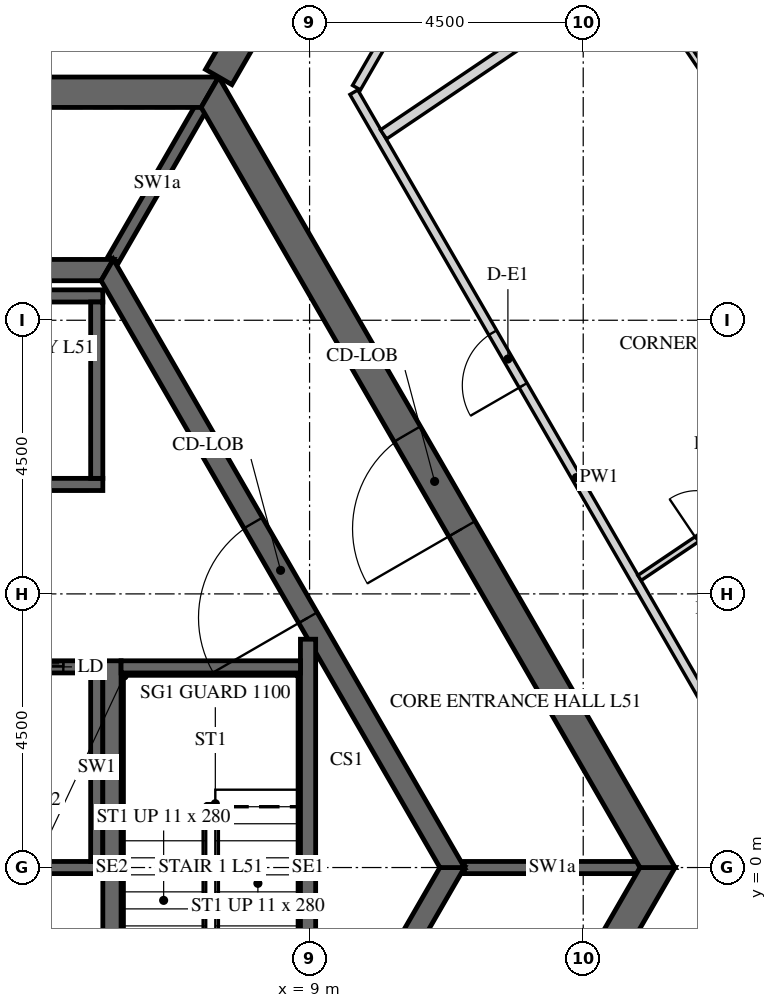
"""IFC4 building model, lengths in metres.
Left out: names, types, materials, properties, quantities, classifications, styles, units other than length and angle.
Written with IfcOpenShell. Run it as: python <this file> out.ifc"""

import sys

from ifc_helpers import new_model, si_unit, direction, frame, frame_2d, origin, place, context, subcontext, project, spatial, polyline, rectangle, outline, extrude, element, fill, save


model = new_model("IFC4")
c1 = context("Model", 3, precision=1e-05, world=origin(), true_north=direction((0.0, 1.0)))
c2 = subcontext(c1, "Body", "Model", "MODEL_VIEW")
j1 = project(units=[si_unit("LENGTHUNIT", "METRE"), si_unit("PLANEANGLEUNIT", "RADIAN")], contexts=[c1])
p1 = place(None, origin())
s1 = spatial("IfcSite", under=j1, at=p1, CompositionType="ELEMENT")
p2 = place(p1, origin())
s2 = spatial("IfcBuilding", under=s1, at=p2, CompositionType="ELEMENT")
p3 = place(p2, frame((0.0, 0.0, 215.1)))
s3 = spatial("IfcBuildingStorey", under=s2, at=p3, CompositionType="ELEMENT", Elevation=215.1)
p4 = place(p3, frame((7.361, -12.75, -0.15), z_axis=(0.0, 0.0, 1.0), x_axis=(0.50000571537, 0.866022103989, 0.0)))
e1 = element("IfcWall", 1, at=p4, inside=s3, PredefinedType="SHEAR", context=c2, shape_type="SweptSolid", body=[
    extrude(outline(polyline([(-0.144, -0.25), (14.867, -0.25), (14.578, 0.25), (0.144, 0.25), (-0.144, -0.25)])), origin(), (0.0, 0.0, 1.0), 3.9),
])
p5 = place(p4, frame((6.49, 0.0, 0.15)))
e2 = element("IfcOpeningElement", 2, at=p5, cuts=e1, PredefinedType="OPENING", context=c2, shape_type="SweptSolid", body=[
    extrude(rectangle(XDim=1.8, YDim=2.4, at=frame_2d((0.9, 1.2))), frame((0.0, 0.26, 0.0), z_axis=(0.0, -1.0, 0.0), x_axis=(1.0, 0.0, 0.0)), (0.0, 0.0, 1.0), 0.52),
])
p6 = place(p3, frame((14.722, 0.0, -0.15), z_axis=(0.0, 0.0, 1.0), x_axis=(-0.50000571537, 0.866022103989, 0.0)))
e3 = element("IfcWall", 3, at=p6, inside=s3, PredefinedType="SHEAR", context=c2, shape_type="SweptSolid", body=[
    extrude(outline(polyline([(-0.144, -0.25), (14.867, -0.25), (14.578, 0.25), (0.144, 0.25), (-0.144, -0.25)])), origin(), (0.0, 0.0, 1.0), 3.9),
])
p7 = place(p6, frame((6.432, 0.0, 0.15)))
e4 = element("IfcOpeningElement", 4, at=p7, cuts=e3, PredefinedType="OPENING", context=c2, shape_type="SweptSolid", body=[
    extrude(rectangle(XDim=1.8, YDim=2.4, at=frame_2d((0.9, 1.2))), frame((0.0, 0.26, 0.0), z_axis=(0.0, -1.0, 0.0), x_axis=(1.0, 0.0, 0.0)), (0.0, 0.0, 1.0), 0.52),
])
p8 = place(p3, frame((7.361, 12.75, -0.15), z_axis=(0.0, 0.0, 1.0), x_axis=(-1.0, 0.0, 0.0)))
e5 = element("IfcWall", 5, at=p8, inside=s3, PredefinedType="SHEAR", context=c2, shape_type="SweptSolid", body=[
    extrude(outline(polyline([(-0.144, -0.25), (14.866, -0.25), (14.578, 0.25), (0.144, 0.25), (-0.144, -0.25)])), origin(), (0.0, 0.0, 1.0), 3.9),
])
p9 = place(p8, frame((6.761, 0.0, 0.15)))
e6 = element("IfcOpeningElement", 6, at=p9, cuts=e5, PredefinedType="OPENING", context=c2, shape_type="SweptSolid", body=[
    extrude(rectangle(XDim=1.2, YDim=2.4, at=frame_2d((0.6, 1.2))), frame((0.0, 0.26, 0.0), z_axis=(0.0, -1.0, 0.0), x_axis=(1.0, 0.0, 0.0)), (0.0, 0.0, 1.0), 0.52),
])
p10 = place(p3, frame((7.506, 13.0, -0.15), z_axis=(0.0, 0.0, 1.0), x_axis=(0.499988271576, 0.866032175087, 0.0)))
e7 = element("IfcWall", 7, at=p10, inside=s3, PredefinedType="SHEAR", context=c2, shape_type="SweptSolid", body=[
    extrude(rectangle(XDim=15.424, YDim=0.5, at=frame_2d((7.712, 0.0))), origin(), (0.0, 0.0, 1.0), 3.9),
])
p11 = place(p10, frame((6.812, 0.0, 0.15)))
e8 = element("IfcOpeningElement", 8, at=p11, cuts=e7, PredefinedType="OPENING", context=c2, shape_type="SweptSolid", body=[
    extrude(rectangle(XDim=1.8, YDim=2.4, at=frame_2d((0.9, 1.2))), frame((0.0, 0.26, 0.0), z_axis=(0.0, -1.0, 0.0), x_axis=(1.0, 0.0, 0.0)), (0.0, 0.0, 1.0), 0.52),
])
p12 = place(p3, frame((5.673, -9.825, -0.15), z_axis=(0.0, 0.0, 1.0), x_axis=(0.499995046907, 0.866028263435, 0.0)))
e9 = element("IfcWall", 9, at=p12, inside=s3, PredefinedType="SHEAR", context=c2, shape_type="SweptSolid", body=[
    extrude(outline(polyline([(-0.101, -0.175), (11.446, -0.175), (11.244, 0.175), (0.101, 0.175), (-0.101, -0.175)])), origin(), (0.0, 0.0, 1.0), 3.9),
])
p13 = place(p12, frame((4.801, 0.0, 0.15)))
e10 = element("IfcOpeningElement", 10, at=p13, cuts=e9, PredefinedType="OPENING", context=c2, shape_type="SweptSolid", body=[
    extrude(rectangle(XDim=1.8, YDim=2.4, at=frame_2d((0.9, 1.2))), frame((0.0, 0.185, 0.0), z_axis=(0.0, -1.0, 0.0), x_axis=(1.0, 0.0, 0.0)), (0.0, 0.0, 1.0), 0.37),
])
p14 = place(p3, frame((11.345, 0.0, -0.15), z_axis=(0.0, 0.0, 1.0), x_axis=(-0.499995046907, 0.866028263435, 0.0)))
e11 = element("IfcWall", 11, at=p14, inside=s3, PredefinedType="SHEAR", context=c2, shape_type="SweptSolid", body=[
    extrude(outline(polyline([(-0.101, -0.175), (11.446, -0.175), (11.244, 0.175), (0.101, 0.175), (-0.101, -0.175)])), origin(), (0.0, 0.0, 1.0), 3.9),
])
p15 = place(p14, frame((4.744, 0.0, 0.15)))
e12 = element("IfcOpeningElement", 12, at=p15, cuts=e11, PredefinedType="OPENING", context=c2, shape_type="SweptSolid", body=[
    extrude(rectangle(XDim=1.8, YDim=2.4, at=frame_2d((0.9, 1.2))), frame((0.0, 0.185, 0.0), z_axis=(0.0, -1.0, 0.0), x_axis=(1.0, 0.0, 0.0)), (0.0, 0.0, 1.0), 0.37),
])
p16 = place(p3, frame((5.673, 9.825, -0.15), z_axis=(0.0, 0.0, 1.0), x_axis=(-1.0, 0.0, 0.0)))
e13 = element("IfcWall", 13, at=p16, inside=s3, PredefinedType="SHEAR", context=c2, shape_type="SweptSolid", body=[
    extrude(outline(polyline([(-0.101, -0.175), (11.446, -0.175), (11.244, 0.175), (0.101, 0.175), (-0.101, -0.175)])), origin(), (0.0, 0.0, 1.0), 3.9),
])
p17 = place(p3, frame((-5.6, 6.3, -0.25), z_axis=(0.0, 0.0, 1.0), x_axis=(1.0, 0.0, 0.0)))
e14 = element("IfcWall", 14, at=p17, inside=s3, PredefinedType="SHEAR", context=c2, shape_type="SweptSolid", body=[
    extrude(rectangle(XDim=11.2, YDim=0.2, at=frame_2d((5.6, 0.0))), origin(), (0.0, 0.0, 1.0), 3.9),
])
p18 = place(p17, frame((8.45, 0.0, 0.25)))
e15 = element("IfcOpeningElement", 15, at=p18, cuts=e14, PredefinedType="OPENING", context=c2, shape_type="SweptSolid", body=[
    extrude(rectangle(XDim=0.9, YDim=2.1, at=frame_2d((0.45, 1.05))), frame((0.0, 0.11, 0.0), z_axis=(0.0, -1.0, 0.0), x_axis=(1.0, 0.0, 0.0)), (0.0, 0.0, 1.0), 0.22),
])
p19 = place(p17, frame((0.65, 0.0, 0.25)))
e16 = element("IfcOpeningElement", 16, at=p19, cuts=e14, PredefinedType="OPENING", context=c2, shape_type="SweptSolid", body=[
    extrude(rectangle(XDim=1.1, YDim=2.1, at=frame_2d((0.55, 1.05))), frame((0.0, 0.11, 0.0), z_axis=(0.0, -1.0, 0.0), x_axis=(1.0, 0.0, 0.0)), (0.0, 0.0, 1.0), 0.22),
])
p20 = place(p17, frame((2.85, 0.0, 0.25)))
e17 = element("IfcOpeningElement", 17, at=p20, cuts=e14, PredefinedType="OPENING", context=c2, shape_type="SweptSolid", body=[
    extrude(rectangle(XDim=1.1, YDim=2.1, at=frame_2d((0.55, 1.05))), frame((0.0, 0.11, 0.0), z_axis=(0.0, -1.0, 0.0), x_axis=(1.0, 0.0, 0.0)), (0.0, 0.0, 1.0), 0.22),
])
p21 = place(p17, frame((5.05, 0.0, 0.25)))
e18 = element("IfcOpeningElement", 18, at=p21, cuts=e14, PredefinedType="OPENING", context=c2, shape_type="SweptSolid", body=[
    extrude(rectangle(XDim=1.1, YDim=2.1, at=frame_2d((0.55, 1.05))), frame((0.0, 0.11, 0.0), z_axis=(0.0, -1.0, 0.0), x_axis=(1.0, 0.0, 0.0)), (0.0, 0.0, 1.0), 0.22),
])
p22 = place(p3, frame((-5.6, 9.4, -0.25), z_axis=(0.0, 0.0, 1.0), x_axis=(1.0, 0.0, 0.0)))
e19 = element("IfcWall", 19, at=p22, inside=s3, PredefinedType="SHEAR", context=c2, shape_type="SweptSolid", body=[
    extrude(rectangle(XDim=11.2, YDim=0.2, at=frame_2d((5.6, 0.0))), origin(), (0.0, 0.0, 1.0), 3.9),
])
p23 = place(p3, frame((5.5, 6.4, -0.25), z_axis=(0.0, 0.0, 1.0), x_axis=(0.0, 1.0, 0.0)))
e20 = element("IfcWall", 20, at=p23, inside=s3, PredefinedType="SHEAR", context=c2, shape_type="SweptSolid", body=[
    extrude(rectangle(XDim=2.9, YDim=0.2, at=frame_2d((1.45, 0.0))), origin(), (0.0, 0.0, 1.0), 3.9),
])
p24 = place(p3, frame((-5.6, 3.3, -0.25), z_axis=(0.0, 0.0, 1.0), x_axis=(1.0, 0.0, 0.0)))
e21 = element("IfcWall", 21, at=p24, inside=s3, PredefinedType="SHEAR", context=c2, shape_type="SweptSolid", body=[
    extrude(rectangle(XDim=11.2, YDim=0.2, at=frame_2d((5.6, 0.0))), origin(), (0.0, 0.0, 1.0), 3.9),
])
p25 = place(p24, frame((0.65, 0.0, 0.25)))
e22 = element("IfcOpeningElement", 22, at=p25, cuts=e21, PredefinedType="OPENING", context=c2, shape_type="SweptSolid", body=[
    extrude(rectangle(XDim=1.1, YDim=2.1, at=frame_2d((0.55, 1.05))), frame((0.0, 0.11, 0.0), z_axis=(0.0, -1.0, 0.0), x_axis=(1.0, 0.0, 0.0)), (0.0, 0.0, 1.0), 0.22),
])
p26 = place(p24, frame((2.85, 0.0, 0.25)))
e23 = element("IfcOpeningElement", 23, at=p26, cuts=e21, PredefinedType="OPENING", context=c2, shape_type="SweptSolid", body=[
    extrude(rectangle(XDim=1.1, YDim=2.1, at=frame_2d((0.55, 1.05))), frame((0.0, 0.11, 0.0), z_axis=(0.0, -1.0, 0.0), x_axis=(1.0, 0.0, 0.0)), (0.0, 0.0, 1.0), 0.22),
])
p27 = place(p24, frame((5.05, 0.0, 0.25)))
e24 = element("IfcOpeningElement", 24, at=p27, cuts=e21, PredefinedType="OPENING", context=c2, shape_type="SweptSolid", body=[
    extrude(rectangle(XDim=1.1, YDim=2.1, at=frame_2d((0.55, 1.05))), frame((0.0, 0.11, 0.0), z_axis=(0.0, -1.0, 0.0), x_axis=(1.0, 0.0, 0.0)), (0.0, 0.0, 1.0), 0.22),
])
p28 = place(p24, frame((7.25, 0.0, 0.25)))
e25 = element("IfcOpeningElement", 25, at=p28, cuts=e21, PredefinedType="OPENING", context=c2, shape_type="SweptSolid", body=[
    extrude(rectangle(XDim=1.1, YDim=2.1, at=frame_2d((0.55, 1.05))), frame((0.0, 0.11, 0.0), z_axis=(0.0, -1.0, 0.0), x_axis=(1.0, 0.0, 0.0)), (0.0, 0.0, 1.0), 0.22),
])
p29 = place(p24, frame((9.45, 0.0, 0.25)))
e26 = element("IfcOpeningElement", 26, at=p29, cuts=e21, PredefinedType="OPENING", context=c2, shape_type="SweptSolid", body=[
    extrude(rectangle(XDim=1.1, YDim=2.1, at=frame_2d((0.55, 1.05))), frame((0.0, 0.11, 0.0), z_axis=(0.0, -1.0, 0.0), x_axis=(1.0, 0.0, 0.0)), (0.0, 0.0, 1.0), 0.22),
])
p30 = place(p3, frame((-5.6, 0.0, -0.25), z_axis=(0.0, 0.0, 1.0), x_axis=(1.0, 0.0, 0.0)))
e27 = element("IfcWall", 27, at=p30, inside=s3, PredefinedType="SHEAR", context=c2, shape_type="SweptSolid", body=[
    extrude(rectangle(XDim=11.2, YDim=0.2, at=frame_2d((5.6, 0.0))), origin(), (0.0, 0.0, 1.0), 3.9),
])
p31 = place(p3, frame((5.5, 0.1, -0.25), z_axis=(0.0, 0.0, 1.0), x_axis=(0.0, 1.0, 0.0)))
e28 = element("IfcWall", 28, at=p31, inside=s3, PredefinedType="SHEAR", context=c2, shape_type="SweptSolid", body=[
    extrude(rectangle(XDim=3.1, YDim=0.2, at=frame_2d((1.55, 0.0))), origin(), (0.0, 0.0, 1.0), 3.9),
])
for number, where, z_axis, x_axis in (
    (29, (11.547, 0.0, -0.15), (0.0, 0.0, 1.0), (1.0, 0.0, 0.0)),
    (30, (5.773, 10.0, -0.15), (0.0, 0.0, 1.0), (0.5, 0.866, 0.0)),
):
    element("IfcWall", number, at=place(p3, frame(where, z_axis=z_axis, x_axis=x_axis)), inside=s3, PredefinedType="SHEAR", context=c2, shape_type="SweptSolid", body=[
        extrude(rectangle(XDim=2.887, YDim=0.2, at=frame_2d((1.443, 0.0))), origin(), (0.0, 0.0, 1.0), 3.9),
    ])
p32 = place(p3, frame((5.75, -3.4, -0.25), z_axis=(0.0, 0.0, 1.0), x_axis=(0.0, 1.0, 0.0)))
e31 = element("IfcWall", 31, at=p32, inside=s3, PredefinedType="SHEAR", context=c2, shape_type="SweptSolid", body=[
    extrude(rectangle(XDim=6.8, YDim=0.3, at=frame_2d((3.4, 0.0))), origin(), (0.0, 0.0, 1.0), 3.9),
])
p33 = place(p3, frame((8.975, -3.755, -0.25), z_axis=(0.0, 0.0, 1.0), x_axis=(0.0, 1.0, 0.0)))
e32 = element("IfcWall", 32, at=p33, inside=s3, PredefinedType="SHEAR", context=c2, shape_type="SweptSolid", body=[
    extrude(rectangle(XDim=7.51, YDim=0.25, at=frame_2d((3.755, 0.0))), origin(), (0.0, 0.0, 1.0), 3.9),
])
p34 = place(p3, frame((5.9, 3.3, -0.25), z_axis=(0.0, 0.0, 1.0), x_axis=(1.0, 0.0, 0.0)))
e33 = element("IfcWall", 33, at=p34, inside=s3, PredefinedType="SHEAR", context=c2, shape_type="SweptSolid", body=[
    extrude(rectangle(XDim=2.95, YDim=0.2, at=frame_2d((1.475, 0.0))), origin(), (0.0, 0.0, 1.0), 3.9),
])
p35 = place(p3, frame((9.772, -12.675, 0.0), z_axis=(0.0, 0.0, 1.0), x_axis=(0.499996322767, 0.866027526826, 0.0)))
e34 = element("IfcWall", 34, at=p35, inside=s3, PredefinedType="PARTITIONING", context=c2, shape_type="SweptSolid", body=[
    extrude(rectangle(XDim=14.636, YDim=0.15, at=frame_2d((7.318, 0.0))), origin(), (0.0, 0.0, 1.0), 2.988),
])
p36 = place(p35, frame((5.361, 0.0, 0.0)))
e35 = element("IfcOpeningElement", 35, at=p36, cuts=e34, PredefinedType="OPENING", context=c2, shape_type="SweptSolid", body=[
    extrude(rectangle(XDim=1.0, YDim=2.1, at=frame_2d((0.5, 1.05))), frame((0.0, 0.085, 0.0), z_axis=(0.0, -1.0, 0.0), x_axis=(1.0, 0.0, 0.0)), (0.0, 0.0, 1.0), 0.17),
])
p37 = place(p35, frame((10.309, 0.0, 0.0)))
e36 = element("IfcOpeningElement", 36, at=p37, cuts=e34, PredefinedType="OPENING", context=c2, shape_type="SweptSolid", body=[
    extrude(rectangle(XDim=1.0, YDim=2.1, at=frame_2d((0.5, 1.05))), frame((0.0, 0.085, 0.0), z_axis=(0.0, -1.0, 0.0), x_axis=(1.0, 0.0, 0.0)), (0.0, 0.0, 1.0), 0.17),
])
p38 = place(p35, frame((13.278, 0.0, 0.0)))
e37 = element("IfcOpeningElement", 37, at=p38, cuts=e34, PredefinedType="OPENING", context=c2, shape_type="SweptSolid", body=[
    extrude(rectangle(XDim=1.0, YDim=2.1, at=frame_2d((0.5, 1.05))), frame((0.0, 0.085, 0.0), z_axis=(0.0, -1.0, 0.0), x_axis=(1.0, 0.0, 0.0)), (0.0, 0.0, 1.0), 0.17),
])
p39 = place(p3, frame((17.046, 0.075, 0.0), z_axis=(0.0, 0.0, 1.0), x_axis=(-0.500008833422, 0.866020303746, 0.0)))
e38 = element("IfcWall", 38, at=p39, inside=s3, PredefinedType="PARTITIONING", context=c2, shape_type="SweptSolid", body=[
    extrude(rectangle(XDim=14.636, YDim=0.15, at=frame_2d((7.318, 0.0))), origin(), (0.0, 0.0, 1.0), 2.988),
])
p40 = place(p39, frame((9.07, 0.0, 0.0)))
e39 = element("IfcOpeningElement", 39, at=p40, cuts=e38, PredefinedType="OPENING", context=c2, shape_type="SweptSolid", body=[
    extrude(rectangle(XDim=1.0, YDim=2.1, at=frame_2d((0.5, 1.05))), frame((0.0, 0.085, 0.0), z_axis=(0.0, -1.0, 0.0), x_axis=(1.0, 0.0, 0.0)), (0.0, 0.0, 1.0), 0.17),
])
p41 = place(p3, frame((9.772, 12.825, 0.0), z_axis=(0.0, 0.0, 1.0), x_axis=(0.499989830942, 0.866031274813, 0.0)))
e40 = element("IfcWall", 40, at=p41, inside=s3, PredefinedType="PARTITIONING", context=c2, shape_type="SweptSolid", body=[
    extrude(rectangle(XDim=7.93, YDim=0.15, at=frame_2d((3.965, 0.0))), origin(), (0.0, 0.0, 1.0), 2.988),
])
p42 = place(p41, frame((2.552, 0.0, 0.0)))
e41 = element("IfcOpeningElement", 41, at=p42, cuts=e40, PredefinedType="OPENING", context=c2, shape_type="SweptSolid", body=[
    extrude(rectangle(XDim=1.0, YDim=2.1, at=frame_2d((0.5, 1.05))), frame((0.0, 0.085, 0.0), z_axis=(0.0, -1.0, 0.0), x_axis=(1.0, 0.0, 0.0)), (0.0, 0.0, 1.0), 0.17),
])
p43 = place(p3, frame((14.426, 4.763, 0.0), z_axis=(0.0, 0.0, 1.0), x_axis=(0.829055983973, 0.559165606451, 0.0)))
e42 = element("IfcWall", 42, at=p43, inside=s3, PredefinedType="PARTITIONING", context=c2, shape_type="SweptSolid", body=[
    extrude(rectangle(XDim=2.935, YDim=0.1, at=frame_2d((1.467, 0.0))), origin(), (0.0, 0.0, 1.0), 2.988),
])
p44 = place(p43, frame((1.135, 0.0, 0.0)))
e43 = element("IfcOpeningElement", 43, at=p44, cuts=e42, PredefinedType="OPENING", context=c2, shape_type="SweptSolid", body=[
    extrude(rectangle(XDim=0.8, YDim=2.1, at=frame_2d((0.4, 1.05))), frame((0.0, 0.06, 0.0), z_axis=(0.0, -1.0, 0.0), x_axis=(1.0, 0.0, 0.0)), (0.0, 0.0, 1.0), 0.12),
])
p45 = place(p3, frame((18.315, 8.895, 0.0), z_axis=(0.0, 0.0, 1.0), x_axis=(-0.559177045947, 0.829048268369, 0.0)))
e44 = element("IfcWall", 44, at=p45, inside=s3, PredefinedType="PARTITIONING", context=c2, shape_type="SweptSolid", body=[
    extrude(rectangle(XDim=7.06, YDim=0.1, at=frame_2d((3.53, 0.0))), origin(), (0.0, 0.0, 1.0), 2.988),
])
p46 = place(p45, frame((3.1, 0.0, 0.0)))
e45 = element("IfcOpeningElement", 45, at=p46, cuts=e44, PredefinedType="OPENING", context=c2, shape_type="SweptSolid", body=[
    extrude(rectangle(XDim=0.9, YDim=2.1, at=frame_2d((0.45, 1.05))), frame((0.0, 0.06, 0.0), z_axis=(0.0, -1.0, 0.0), x_axis=(1.0, 0.0, 0.0)), (0.0, 0.0, 1.0), 0.12),
])
p47 = place(p3, frame((20.363, 18.9, 0.0), z_axis=(0.0, 0.0, 1.0), x_axis=(-0.829030622766, -0.559203206819, 0.0)))
e46 = element("IfcWall", 46, at=p47, inside=s3, PredefinedType="PARTITIONING", context=c2, shape_type="SweptSolid", body=[
    extrude(rectangle(XDim=12.239, YDim=0.18, at=frame_2d((6.12, 0.0))), origin(), (0.0, 0.0, 1.0), 2.988),
])
p48 = place(p7, origin())
e47 = element("IfcDoor", 47, at=p48, inside=s3, OperationType="DOUBLE_DOOR_SINGLE_SWING", PredefinedType="DOOR", context=c2, shape_type="SweptSolid", body=[
    extrude(rectangle(XDim=1.8, YDim=2.4, at=frame_2d((0.9, 1.2))), frame((0.0, 0.025, 0.0), z_axis=(0.0, -1.0, 0.0), x_axis=(1.0, 0.0, 0.0)), (0.0, 0.0, 1.0), 0.05),
])
fill(e4, e47)
p49 = place(p15, origin())
e48 = element("IfcDoor", 48, at=p49, inside=s3, OperationType="DOUBLE_DOOR_SINGLE_SWING", PredefinedType="DOOR", context=c2, shape_type="SweptSolid", body=[
    extrude(rectangle(XDim=1.8, YDim=2.4, at=frame_2d((0.9, 1.2))), frame((0.0, 0.025, 0.0), z_axis=(0.0, -1.0, 0.0), x_axis=(1.0, 0.0, 0.0)), (0.0, 0.0, 1.0), 0.05),
])
fill(e12, e48)
p50 = place(p29, origin())
e49 = element("IfcDoor", 49, at=p50, inside=s3, OperationType="SLIDING_TO_LEFT", PredefinedType="DOOR", context=c2, shape_type="SweptSolid", body=[
    extrude(rectangle(XDim=1.1, YDim=2.1, at=frame_2d((0.55, 1.05))), frame((0.0, 0.025, 0.0), z_axis=(0.0, -1.0, 0.0), x_axis=(1.0, 0.0, 0.0)), (0.0, 0.0, 1.0), 0.05),
])
fill(e26, e49)
p51 = place(p40, origin())
e50 = element("IfcDoor", 50, at=p51, inside=s3, OperationType="SINGLE_SWING_RIGHT", PredefinedType="DOOR", context=c2, shape_type="SweptSolid", body=[
    extrude(rectangle(XDim=1.0, YDim=2.1, at=frame_2d((0.5, 1.05))), frame((0.0, 0.025, 0.0), z_axis=(0.0, -1.0, 0.0), x_axis=(1.0, 0.0, 0.0)), (0.0, 0.0, 1.0), 0.05),
])
fill(e39, e50)
p52 = place(p44, origin())
e51 = element("IfcDoor", 51, at=p52, inside=s3, OperationType="SINGLE_SWING_LEFT", PredefinedType="DOOR", context=c2, shape_type="SweptSolid", body=[
    extrude(rectangle(XDim=0.8, YDim=2.1, at=frame_2d((0.4, 1.05))), frame((0.0, 0.025, 0.0), z_axis=(0.0, -1.0, 0.0), x_axis=(1.0, 0.0, 0.0)), (0.0, 0.0, 1.0), 0.05),
])
fill(e43, e51)
save(model, sys.argv[1])
